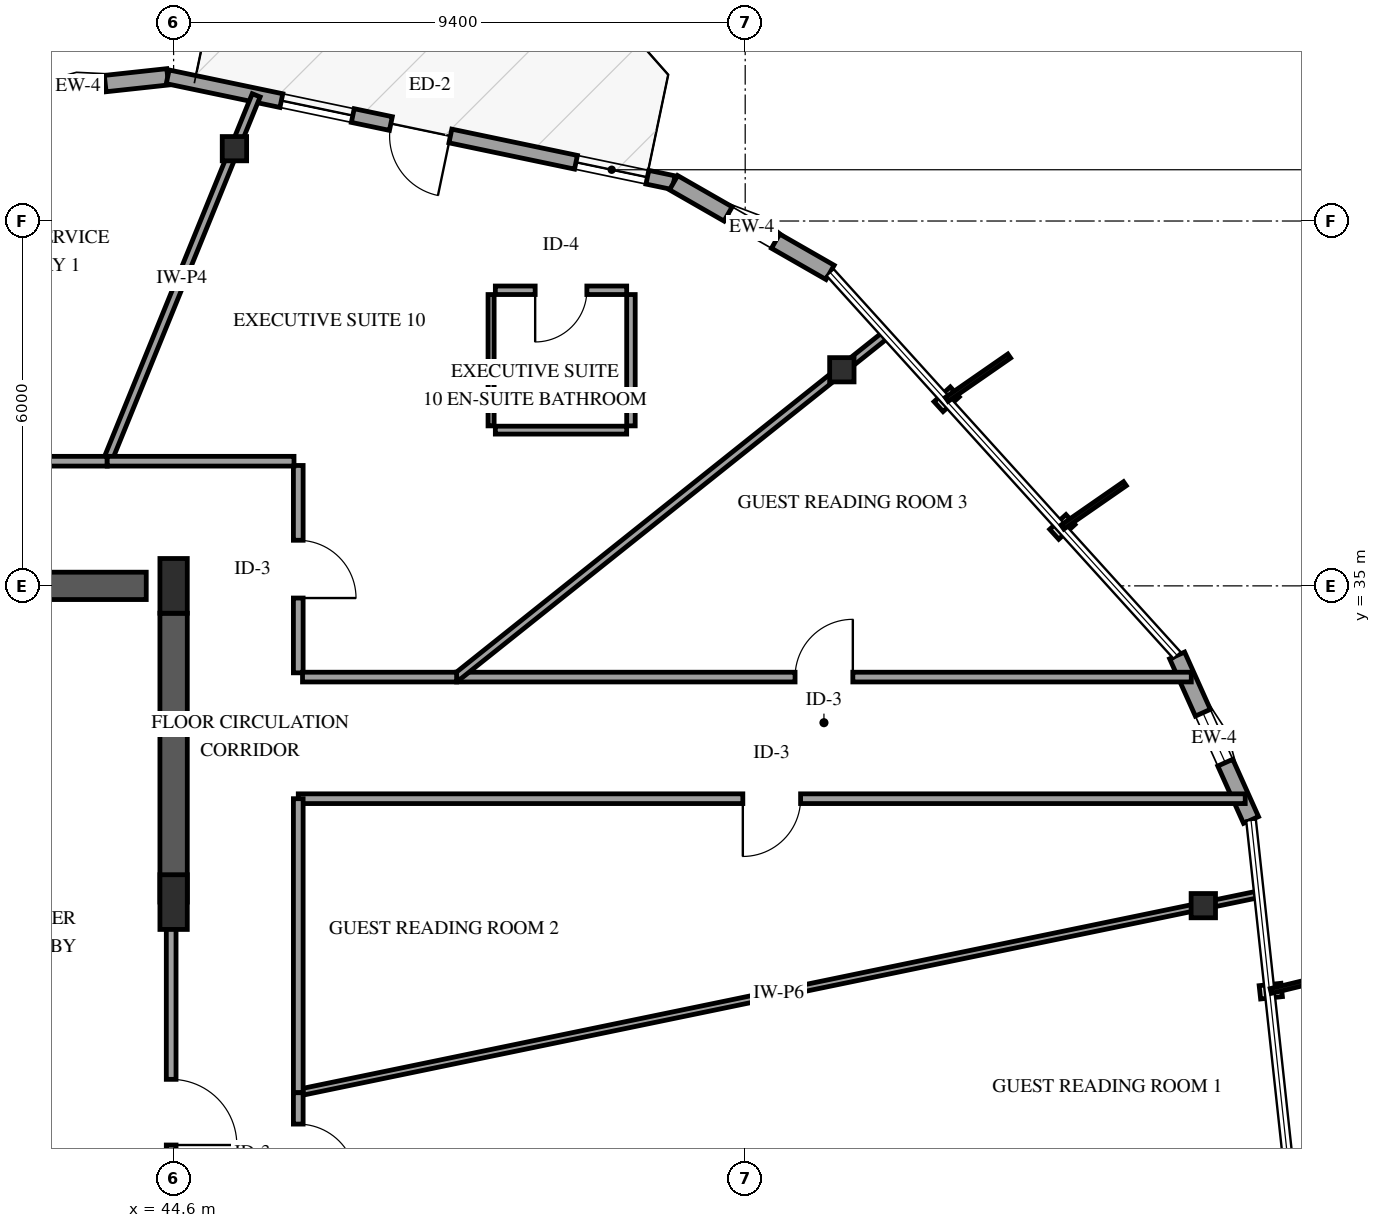
"""IFC4 building model, lengths in metres.
Left out: names, types, materials, properties, quantities, classifications, styles, units other than length and angle.
Written with IfcOpenShell. Run it as: python <this file> out.ifc"""

import sys

from ifc_helpers import new_model, si_unit, direction, frame, frame_2d, origin, origin_2d, place, context, subcontext, project, spatial, rectangle, i_section, extrude, element, fill, save


model = new_model("IFC4")
c1 = context("Model", 3, precision=1e-05, world=origin(), true_north=direction((0.0, 1.0)))
c2 = subcontext(c1, "Body", "Model", "MODEL_VIEW")
j1 = project(units=[si_unit("LENGTHUNIT", "METRE"), si_unit("PLANEANGLEUNIT", "RADIAN")], contexts=[c1])
p1 = place(None, origin())
s1 = spatial("IfcSite", under=j1, at=p1, CompositionType="ELEMENT")
p2 = place(p1, origin())
s2 = spatial("IfcBuilding", under=s1, at=p2, CompositionType="ELEMENT")
p3 = place(p2, frame((0.0, 0.0, 253.75)))
s3 = spatial("IfcBuildingStorey", under=s2, at=p3, CompositionType="ELEMENT", Elevation=253.75)
p4 = place(p3, frame((41.3, 35.0, 0.0), z_axis=(0.0, 0.0, 1.0), x_axis=(1.0, 0.0, 0.0)))
e1 = element("IfcWall", 1, at=p4, inside=s3, PredefinedType="SHEAR", context=c2, shape_type="SweptSolid", body=[
    extrude(rectangle(XDim=2.85, YDim=0.45, at=frame_2d((1.425, 0.0))), origin(), (0.0, 0.0, 1.0), 3.75),
])
p5 = place(p3, frame((44.6, 29.8, 0.0), z_axis=(0.0, 0.0, 1.0), x_axis=(0.0, 1.0, 0.0)))
e2 = element("IfcWall", 2, at=p5, inside=s3, PredefinedType="SHEAR", context=c2, shape_type="SweptSolid", body=[
    extrude(rectangle(XDim=4.75, YDim=0.45, at=frame_2d((2.375, 0.0))), origin(), (0.0, 0.0, 1.0), 3.75),
])
for number, where, z_axis, x_axis in (
    (3, (44.6, 29.8, 0.0), (0.0, 0.0, 1.0), (1.0, 0.0, 0.0)),
    (4, (44.6, 35.0, 0.0), (0.0, 0.0, 1.0), (1.0, 0.0, 0.0)),
):
    element("IfcColumn", number, at=place(p3, frame(where, z_axis=z_axis, x_axis=x_axis)), inside=s3, PredefinedType="PILASTER", context=c2, shape_type="SweptSolid", body=[
        extrude(rectangle(XDim=0.45, YDim=0.9, at=origin_2d()), origin(), (0.0, 0.0, 1.0), 3.75),
    ])
for number, where, z_axis, x_axis in (
    (5, (61.534, 29.741, 0.0), (0.0, 0.0, 1.0), (1.0, 0.0, 0.0)),
    (6, (55.589, 38.554, 0.0), (0.0, 0.0, 1.0), (1.0, 0.0, 0.0)),
    (7, (45.6, 42.189, 0.0), (0.0, 0.0, 1.0), (1.0, 0.0, 0.0)),
):
    element("IfcColumn", number, at=place(p3, frame(where, z_axis=z_axis, x_axis=x_axis)), inside=s3, PredefinedType="COLUMN", context=c2, shape_type="SweptSolid", body=[
        extrude(i_section(OverallWidth=0.401, OverallDepth=0.399, WebThickness=0.025, FlangeThickness=0.04, FilletRadius=0.038, at=origin_2d()), origin(), (0.0, 0.0, 1.0), 3.75),
    ])
p6 = place(p3, frame((44.503, 43.371, 0.0), z_axis=(0.0, 0.0, 1.0), x_axis=(-0.994188969029, -0.107648938037, 0.0)))
e8 = element("IfcWall", 8, at=p6, inside=s3, PredefinedType="SOLIDWALL", context=c2, shape_type="SweptSolid", body=[
    extrude(rectangle(XDim=2.967, YDim=0.27, at=frame_2d((1.483, 0.0))), origin(), (0.0, 0.0, 1.0), 2.829),
])
p7 = place(p6, frame((1.033, 0.0, 0.75)))
e9 = element("IfcOpeningElement", 9, at=p7, cuts=e8, PredefinedType="OPENING", context=c2, shape_type="SweptSolid", body=[
    extrude(rectangle(XDim=0.9, YDim=1.5, at=frame_2d((0.45, 0.75))), frame((0.0, 0.145, 0.0), z_axis=(0.0, -1.0, 0.0), x_axis=(1.0, 0.0, 0.0)), (0.0, 0.0, 1.0), 0.29),
])
p8 = place(p3, frame((52.822, 41.63, 0.0), z_axis=(0.0, 0.0, 1.0), x_axis=(-0.978792902195, 0.204852275096, 0.0)))
e10 = element("IfcWall", 10, at=p8, inside=s3, PredefinedType="SOLIDWALL", context=c2, shape_type="SweptSolid", body=[
    extrude(rectangle(XDim=8.5, YDim=0.23, at=frame_2d((4.25, 0.0))), origin(), (0.0, 0.0, 1.0), 2.829),
])
p9 = place(p8, frame((3.75, 0.0, 0.0)))
e11 = element("IfcOpeningElement", 11, at=p9, cuts=e10, PredefinedType="OPENING", context=c2, shape_type="SweptSolid", body=[
    extrude(rectangle(XDim=1.0, YDim=2.15, at=frame_2d((0.5, 1.075))), frame((0.0, 0.125, 0.0), z_axis=(0.0, -1.0, 0.0), x_axis=(1.0, 0.0, 0.0)), (0.0, 0.0, 1.0), 0.25),
])
p10 = place(p8, frame((0.44, 0.0, 0.72)))
e12 = element("IfcOpeningElement", 12, at=p10, cuts=e10, PredefinedType="OPENING", context=c2, shape_type="SweptSolid", body=[
    extrude(rectangle(XDim=1.2, YDim=1.6, at=frame_2d((0.6, 0.8))), frame((0.0, 0.125, 0.0), z_axis=(0.0, -1.0, 0.0), x_axis=(1.0, 0.0, 0.0)), (0.0, 0.0, 1.0), 0.25),
])
p11 = place(p8, frame((5.39, 0.0, 0.72)))
e13 = element("IfcOpeningElement", 13, at=p11, cuts=e10, PredefinedType="OPENING", context=c2, shape_type="SweptSolid", body=[
    extrude(rectangle(XDim=1.2, YDim=1.6, at=frame_2d((0.6, 0.8))), frame((0.0, 0.125, 0.0), z_axis=(0.0, -1.0, 0.0), x_axis=(1.0, 0.0, 0.0)), (0.0, 0.0, 1.0), 0.25),
])
p12 = place(p3, frame((62.318, 31.15, 0.0), z_axis=(0.0, 0.0, 1.0), x_axis=(-0.40959459615, 0.912267650859, 0.0)))
e14 = element("IfcWall", 14, at=p12, inside=s3, PredefinedType="SOLIDWALL", context=c2, shape_type="SweptSolid", body=[
    extrude(rectangle(XDim=2.967, YDim=0.27, at=frame_2d((1.483, 0.0))), origin(), (0.0, 0.0, 1.0), 2.829),
])
p13 = place(p12, frame((1.033, 0.0, 0.75)))
e15 = element("IfcOpeningElement", 15, at=p13, cuts=e14, PredefinedType="OPENING", context=c2, shape_type="SweptSolid", body=[
    extrude(rectangle(XDim=0.9, YDim=1.5, at=frame_2d((0.45, 0.75))), frame((0.0, 0.145, 0.0), z_axis=(0.0, -1.0, 0.0), x_axis=(1.0, 0.0, 0.0)), (0.0, 0.0, 1.0), 0.29),
])
p14 = place(p3, frame((55.396, 40.155, 0.0), z_axis=(0.0, 0.0, 1.0), x_axis=(-0.867604284104, 0.497255272677, 0.0)))
e16 = element("IfcWall", 16, at=p14, inside=s3, PredefinedType="SOLIDWALL", context=c2, shape_type="SweptSolid", body=[
    extrude(rectangle(XDim=2.967, YDim=0.27, at=frame_2d((1.483, 0.0))), origin(), (0.0, 0.0, 1.0), 2.829),
])
p15 = place(p14, frame((1.033, 0.0, 0.75)))
e17 = element("IfcOpeningElement", 17, at=p15, cuts=e16, PredefinedType="OPENING", context=c2, shape_type="SweptSolid", body=[
    extrude(rectangle(XDim=0.9, YDim=1.5, at=frame_2d((0.45, 0.75))), frame((0.0, 0.145, 0.0), z_axis=(0.0, -1.0, 0.0), x_axis=(1.0, 0.0, 0.0)), (0.0, 0.0, 1.0), 0.29),
])
p16 = place(p3, frame((46.65, 26.665, 0.0), z_axis=(0.0, 0.0, 1.0), x_axis=(0.979310600043, 0.202362913212, 0.0)))
e18 = element("IfcWall", 18, at=p16, inside=s3, PredefinedType="PARTITIONING", context=c2, shape_type="SweptSolid", body=[
    extrude(rectangle(XDim=16.134, YDim=0.11, at=frame_2d((8.067, 0.0))), origin(), (0.0, 0.0, 1.0), 2.745),
])
p17 = place(p3, frame((62.223, 31.5, 0.0), z_axis=(0.0, 0.0, 1.0), x_axis=(-1.0, 0.0, 0.0)))
e19 = element("IfcWall", 19, at=p17, inside=s3, PredefinedType="PARTITIONING", context=c2, shape_type="SweptSolid", body=[
    extrude(rectangle(XDim=15.573, YDim=0.16, at=frame_2d((7.787, 0.0))), origin(), (0.0, 0.0, 1.0), 3.45),
])
p18 = place(p17, frame((7.312, 0.0, 0.0)))
e20 = element("IfcOpeningElement", 20, at=p18, cuts=e19, PredefinedType="OPENING", context=c2, shape_type="SweptSolid", body=[
    extrude(rectangle(XDim=0.95, YDim=2.15, at=frame_2d((0.475, 1.075))), frame((0.0, 0.09, 0.0), z_axis=(0.0, -1.0, 0.0), x_axis=(1.0, 0.0, 0.0)), (0.0, 0.0, 1.0), 0.18),
])
p19 = place(p3, frame((49.254, 33.5, 0.0), z_axis=(0.0, 0.0, 1.0), x_axis=(1.0, 0.0, 0.0)))
e21 = element("IfcWall", 21, at=p19, inside=s3, PredefinedType="PARTITIONING", context=c2, shape_type="SweptSolid", body=[
    extrude(rectangle(XDim=12.082, YDim=0.16, at=frame_2d((6.041, 0.0))), origin(), (0.0, 0.0, 1.0), 3.45),
])
p20 = place(p19, frame((5.566, 0.0, 0.0)))
e22 = element("IfcOpeningElement", 22, at=p20, cuts=e21, PredefinedType="OPENING", context=c2, shape_type="SweptSolid", body=[
    extrude(rectangle(XDim=0.95, YDim=2.15, at=frame_2d((0.475, 1.075))), frame((0.0, 0.09, 0.0), z_axis=(0.0, -1.0, 0.0), x_axis=(1.0, 0.0, 0.0)), (0.0, 0.0, 1.0), 0.18),
])
p21 = place(p3, frame((49.254, 33.5, 0.0), z_axis=(0.0, 0.0, 1.0), x_axis=(0.781740382818, 0.623604020089, 0.0)))
e23 = element("IfcWall", 23, at=p21, inside=s3, PredefinedType="PARTITIONING", context=c2, shape_type="SweptSolid", body=[
    extrude(rectangle(XDim=9.038, YDim=0.13, at=frame_2d((4.519, 0.0))), origin(), (0.0, 0.0, 1.0), 3.45),
])
p22 = place(p3, frame((44.56, 29.8, 0.0), z_axis=(0.0, 0.0, 1.0), x_axis=(0.0, -1.0, 0.0)))
e24 = element("IfcWall", 24, at=p22, inside=s3, PredefinedType="PARTITIONING", context=c2, shape_type="SweptSolid", body=[
    extrude(rectangle(XDim=6.91, YDim=0.16, at=frame_2d((3.455, 0.0))), origin(), (0.0, 0.0, 1.0), 2.49),
])
p23 = place(p22, frame((2.915, 0.0, 0.0)))
e25 = element("IfcOpeningElement", 25, at=p23, cuts=e24, PredefinedType="OPENING", context=c2, shape_type="SweptSolid", body=[
    extrude(rectangle(XDim=1.08, YDim=2.15, at=frame_2d((0.54, 1.075))), frame((0.0, 0.09, 0.0), z_axis=(0.0, -1.0, 0.0), x_axis=(1.0, 0.0, 0.0)), (0.0, 0.0, 1.0), 0.18),
])
p24 = place(p3, frame((43.508, 37.05, 0.0), z_axis=(0.0, 0.0, 1.0), x_axis=(0.377117821417, 0.926165292359, 0.0)))
e26 = element("IfcWall", 26, at=p24, inside=s3, PredefinedType="PARTITIONING", context=c2, shape_type="SweptSolid", body=[
    extrude(rectangle(XDim=6.497, YDim=0.14, at=frame_2d((3.248, 0.0))), origin(), (0.0, 0.0, 1.0), 2.745),
])
p25 = place(p3, frame((46.65, 31.5, 0.0), z_axis=(0.0, 0.0, 1.0), x_axis=(0.0, -1.0, 0.0)))
e27 = element("IfcWall", 27, at=p25, inside=s3, PredefinedType="PARTITIONING", context=c2, shape_type="SweptSolid", body=[
    extrude(rectangle(XDim=4.835, YDim=0.16, at=frame_2d((2.417, 0.0))), origin(), (0.0, 0.0, 1.0), 3.45),
])
p26 = place(p3, frame((39.595, 37.05, 0.0), z_axis=(0.0, 0.0, 1.0), x_axis=(1.0, 0.0, 0.0)))
e28 = element("IfcWall", 28, at=p26, inside=s3, PredefinedType="PARTITIONING", context=c2, shape_type="SweptSolid", body=[
    extrude(rectangle(XDim=3.913, YDim=0.16, at=frame_2d((1.957, 0.0))), origin(), (0.0, 0.0, 1.0), 3.45),
])
p27 = place(p26, frame((1.482, 0.0, 0.0)))
e29 = element("IfcOpeningElement", 29, at=p27, cuts=e28, PredefinedType="OPENING", context=c2, shape_type="SweptSolid", body=[
    extrude(rectangle(XDim=0.95, YDim=2.15, at=frame_2d((0.475, 1.075))), frame((0.0, 0.09, 0.0), z_axis=(0.0, -1.0, 0.0), x_axis=(1.0, 0.0, 0.0)), (0.0, 0.0, 1.0), 0.18),
])
p28 = place(p3, frame((46.65, 36.98, 0.0), z_axis=(0.0, 0.0, 1.0), x_axis=(0.0, -1.0, 0.0)))
e30 = element("IfcWall", 30, at=p28, inside=s3, PredefinedType="PARTITIONING", context=c2, shape_type="SweptSolid", body=[
    extrude(rectangle(XDim=3.41, YDim=0.16, at=frame_2d((1.705, 0.0))), origin(), (0.0, 0.0, 1.0), 3.45),
])
p29 = place(p28, frame((1.23, 0.0, 0.0)))
e31 = element("IfcOpeningElement", 31, at=p29, cuts=e30, PredefinedType="OPENING", context=c2, shape_type="SweptSolid", body=[
    extrude(rectangle(XDim=0.95, YDim=2.15, at=frame_2d((0.475, 1.075))), frame((0.0, 0.09, 0.0), z_axis=(0.0, -1.0, 0.0), x_axis=(1.0, 0.0, 0.0)), (0.0, 0.0, 1.0), 0.18),
])
p30 = place(p3, frame((43.508, 37.05, 0.0), z_axis=(0.0, 0.0, 1.0), x_axis=(1.0, 0.0, 0.0)))
e32 = element("IfcWall", 32, at=p30, inside=s3, PredefinedType="PARTITIONING", context=c2, shape_type="SweptSolid", body=[
    extrude(rectangle(XDim=3.072, YDim=0.16, at=frame_2d((1.536, 0.0))), origin(), (0.0, 0.0, 1.0), 3.45),
])
p31 = place(p3, frame((46.72, 33.5, 0.0), z_axis=(0.0, 0.0, 1.0), x_axis=(1.0, 0.0, 0.0)))
e33 = element("IfcWall", 33, at=p31, inside=s3, PredefinedType="PARTITIONING", context=c2, shape_type="SweptSolid", body=[
    extrude(rectangle(XDim=2.534, YDim=0.16, at=frame_2d((1.267, 0.0))), origin(), (0.0, 0.0, 1.0), 3.45),
])
p32 = place(p3, frame((52.051, 39.861, 0.0), z_axis=(0.0, 0.0, 1.0), x_axis=(-1.0, 0.0, 0.0)))
e34 = element("IfcWall", 34, at=p32, inside=s3, PredefinedType="PARTITIONING", context=c2, shape_type="SweptSolid", body=[
    extrude(rectangle(XDim=2.16, YDim=0.14, at=frame_2d((1.08, 0.0))), origin(), (0.0, 0.0, 1.0), 3.45),
])
p33 = place(p32, frame((0.655, 0.0, 0.0)))
e35 = element("IfcOpeningElement", 35, at=p33, cuts=e34, PredefinedType="OPENING", context=c2, shape_type="SweptSolid", body=[
    extrude(rectangle(XDim=0.85, YDim=2.1, at=frame_2d((0.425, 1.05))), frame((0.0, 0.08, 0.0), z_axis=(0.0, -1.0, 0.0), x_axis=(1.0, 0.0, 0.0)), (0.0, 0.0, 1.0), 0.16),
])
p34 = place(p3, frame((49.891, 37.561, 0.0), z_axis=(0.0, 0.0, 1.0), x_axis=(1.0, 0.0, 0.0)))
e36 = element("IfcWall", 36, at=p34, inside=s3, PredefinedType="PARTITIONING", context=c2, shape_type="SweptSolid", body=[
    extrude(rectangle(XDim=2.16, YDim=0.13, at=frame_2d((1.08, 0.0))), origin(), (0.0, 0.0, 1.0), 3.45),
])
p35 = place(p3, frame((49.821, 39.791, 0.0), z_axis=(0.0, 0.0, 1.0), x_axis=(0.0, -1.0, 0.0)))
e37 = element("IfcWall", 37, at=p35, inside=s3, PredefinedType="PARTITIONING", context=c2, shape_type="SweptSolid", body=[
    extrude(rectangle(XDim=2.16, YDim=0.1, at=frame_2d((1.08, 0.0))), origin(), (0.0, 0.0, 1.0), 3.45),
])
p36 = place(p3, frame((52.121, 37.631, 0.0), z_axis=(0.0, 0.0, 1.0), x_axis=(0.0, 1.0, 0.0)))
e38 = element("IfcWall", 38, at=p36, inside=s3, PredefinedType="PARTITIONING", context=c2, shape_type="SweptSolid", body=[
    extrude(rectangle(XDim=2.16, YDim=0.14, at=frame_2d((1.08, 0.0))), origin(), (0.0, 0.0, 1.0), 3.45),
])
p37 = place(p3, frame((46.65, 26.665, 0.0), z_axis=(0.0, 0.0, 1.0), x_axis=(0.0, -1.0, 0.0)))
e39 = element("IfcWall", 39, at=p37, inside=s3, PredefinedType="PARTITIONING", context=c2, shape_type="SweptSolid", body=[
    extrude(rectangle(XDim=1.982, YDim=0.16, at=frame_2d((0.991, 0.0))), origin(), (0.0, 0.0, 1.0), 3.45),
])
p38 = place(p37, frame((0.516, 0.0, 0.0)))
e40 = element("IfcOpeningElement", 40, at=p38, cuts=e39, PredefinedType="OPENING", context=c2, shape_type="SweptSolid", body=[
    extrude(rectangle(XDim=0.95, YDim=2.15, at=frame_2d((0.475, 1.075))), frame((0.0, 0.09, 0.0), z_axis=(0.0, -1.0, 0.0), x_axis=(1.0, 0.0, 0.0)), (0.0, 0.0, 1.0), 0.18),
])
p39 = place(p7, origin())
e41 = element("IfcWindow", 41, at=p39, inside=s3, PartitioningType="SINGLE_PANEL", PredefinedType="WINDOW", context=c2, shape_type="SweptSolid", body=[
    extrude(rectangle(XDim=0.9, YDim=1.5, at=frame_2d((0.45, 0.75))), frame((0.0, 0.03, 0.0), z_axis=(0.0, -1.0, 0.0), x_axis=(1.0, 0.0, 0.0)), (0.0, 0.0, 1.0), 0.06),
])
fill(e9, e41)
p40 = place(p9, origin())
e42 = element("IfcDoor", 42, at=p40, inside=s3, OperationType="SINGLE_SWING_LEFT", PredefinedType="DOOR", context=c2, shape_type="SweptSolid", body=[
    extrude(rectangle(XDim=1.0, YDim=2.15, at=frame_2d((0.5, 1.075))), frame((0.0, 0.025, 0.0), z_axis=(0.0, -1.0, 0.0), x_axis=(1.0, 0.0, 0.0)), (0.0, 0.0, 1.0), 0.05),
])
fill(e11, e42)
p41 = place(p10, origin())
e43 = element("IfcWindow", 43, at=p41, inside=s3, PartitioningType="SINGLE_PANEL", PredefinedType="WINDOW", context=c2, shape_type="SweptSolid", body=[
    extrude(rectangle(XDim=1.2, YDim=1.6, at=frame_2d((0.6, 0.8))), frame((0.0, 0.03, 0.0), z_axis=(0.0, -1.0, 0.0), x_axis=(1.0, 0.0, 0.0)), (0.0, 0.0, 1.0), 0.06),
])
fill(e12, e43)
p42 = place(p11, origin())
e44 = element("IfcWindow", 44, at=p42, inside=s3, PartitioningType="SINGLE_PANEL", PredefinedType="WINDOW", context=c2, shape_type="SweptSolid", body=[
    extrude(rectangle(XDim=1.2, YDim=1.6, at=frame_2d((0.6, 0.8))), frame((0.0, 0.03, 0.0), z_axis=(0.0, -1.0, 0.0), x_axis=(1.0, 0.0, 0.0)), (0.0, 0.0, 1.0), 0.06),
])
fill(e13, e44)
p43 = place(p13, origin())
e45 = element("IfcWindow", 45, at=p43, inside=s3, PartitioningType="SINGLE_PANEL", PredefinedType="WINDOW", context=c2, shape_type="SweptSolid", body=[
    extrude(rectangle(XDim=0.9, YDim=1.5, at=frame_2d((0.45, 0.75))), frame((0.0, 0.03, 0.0), z_axis=(0.0, -1.0, 0.0), x_axis=(1.0, 0.0, 0.0)), (0.0, 0.0, 1.0), 0.06),
])
fill(e15, e45)
p44 = place(p15, origin())
e46 = element("IfcWindow", 46, at=p44, inside=s3, PartitioningType="SINGLE_PANEL", PredefinedType="WINDOW", context=c2, shape_type="SweptSolid", body=[
    extrude(rectangle(XDim=0.9, YDim=1.5, at=frame_2d((0.45, 0.75))), frame((0.0, 0.03, 0.0), z_axis=(0.0, -1.0, 0.0), x_axis=(1.0, 0.0, 0.0)), (0.0, 0.0, 1.0), 0.06),
])
fill(e17, e46)
p45 = place(p18, origin())
e47 = element("IfcDoor", 47, at=p45, inside=s3, OperationType="SINGLE_SWING_RIGHT", PredefinedType="DOOR", context=c2, shape_type="SweptSolid", body=[
    extrude(rectangle(XDim=0.95, YDim=2.15, at=frame_2d((0.475, 1.075))), frame((0.0, 0.025, 0.0), z_axis=(0.0, -1.0, 0.0), x_axis=(1.0, 0.0, 0.0)), (0.0, 0.0, 1.0), 0.05),
])
fill(e20, e47)
p46 = place(p20, origin())
e48 = element("IfcDoor", 48, at=p46, inside=s3, OperationType="SINGLE_SWING_RIGHT", PredefinedType="DOOR", context=c2, shape_type="SweptSolid", body=[
    extrude(rectangle(XDim=0.95, YDim=2.15, at=frame_2d((0.475, 1.075))), frame((0.0, 0.025, 0.0), z_axis=(0.0, -1.0, 0.0), x_axis=(1.0, 0.0, 0.0)), (0.0, 0.0, 1.0), 0.05),
])
fill(e22, e48)
p47 = place(p23, origin())
e49 = element("IfcDoor", 49, at=p47, inside=s3, OperationType="SINGLE_SWING_RIGHT", PredefinedType="DOOR", context=c2, shape_type="SweptSolid", body=[
    extrude(rectangle(XDim=1.08, YDim=2.15, at=frame_2d((0.54, 1.075))), frame((0.0, 0.025, 0.0), z_axis=(0.0, -1.0, 0.0), x_axis=(1.0, 0.0, 0.0)), (0.0, 0.0, 1.0), 0.05),
])
fill(e25, e49)
p48 = place(p29, origin())
e50 = element("IfcDoor", 50, at=p48, inside=s3, OperationType="SINGLE_SWING_RIGHT", PredefinedType="DOOR", context=c2, shape_type="SweptSolid", body=[
    extrude(rectangle(XDim=0.95, YDim=2.15, at=frame_2d((0.475, 1.075))), frame((0.0, 0.025, 0.0), z_axis=(0.0, -1.0, 0.0), x_axis=(1.0, 0.0, 0.0)), (0.0, 0.0, 1.0), 0.05),
])
fill(e31, e50)
p49 = place(p33, origin())
e51 = element("IfcDoor", 51, at=p49, inside=s3, OperationType="SINGLE_SWING_RIGHT", PredefinedType="DOOR", context=c2, shape_type="SweptSolid", body=[
    extrude(rectangle(XDim=0.85, YDim=2.1, at=frame_2d((0.425, 1.05))), frame((0.0, 0.025, 0.0), z_axis=(0.0, -1.0, 0.0), x_axis=(1.0, 0.0, 0.0)), (0.0, 0.0, 1.0), 0.05),
])
fill(e35, e51)
p50 = place(p38, origin())
e52 = element("IfcDoor", 52, at=p50, inside=s3, OperationType="SINGLE_SWING_RIGHT", PredefinedType="DOOR", context=c2, shape_type="SweptSolid", body=[
    extrude(rectangle(XDim=0.95, YDim=2.15, at=frame_2d((0.475, 1.075))), frame((0.0, 0.025, 0.0), z_axis=(0.0, -1.0, 0.0), x_axis=(1.0, 0.0, 0.0)), (0.0, 0.0, 1.0), 0.05),
])
fill(e40, e52)
save(model, sys.argv[1])
